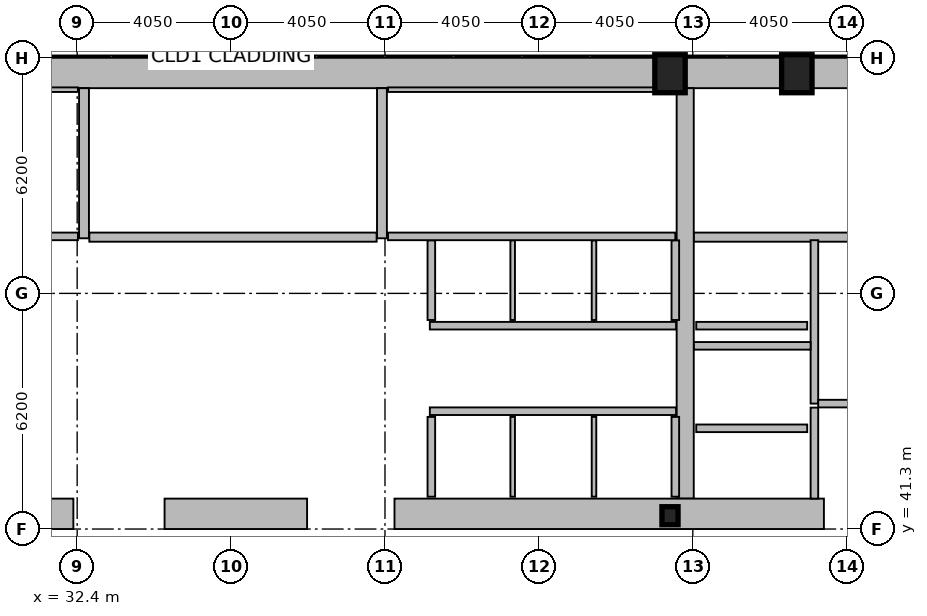
"""IFC4 building model, lengths in metres.
Left out: names, types, materials, properties, quantities, classifications, styles, units other than length and angle.
Written with IfcOpenShell. Run it as: python <this file> out.ifc"""

import sys

from ifc_helpers import new_model, si_unit, direction, frame, frame_2d, origin, origin_2d, place, context, subcontext, project, spatial, rectangle, hollow_rectangle, i_section, extrude, element, fill, save


model = new_model("IFC4")
c1 = context("Model", 3, precision=1e-05, world=origin(), true_north=direction((0.0, 1.0)))
c2 = subcontext(c1, "Body", "Model", "MODEL_VIEW")
j1 = project(units=[si_unit("LENGTHUNIT", "METRE"), si_unit("PLANEANGLEUNIT", "RADIAN")], contexts=[c1])
p1 = place(None, origin())
s1 = spatial("IfcSite", under=j1, at=p1, CompositionType="ELEMENT")
p2 = place(p1, origin())
s2 = spatial("IfcBuilding", under=s1, at=p2, CompositionType="ELEMENT")
p3 = place(p2, origin())
s3 = spatial("IfcBuildingStorey", under=s2, at=p3, CompositionType="ELEMENT", Elevation=0.0)
p4 = place(p3, frame((16.2, 53.3, 0.0), z_axis=(0.0, 0.0, 1.0), x_axis=(1.0, 0.0, 0.0)))
e1 = element("IfcWall", 1, at=p4, inside=s3, PredefinedType="SHEAR", context=c2, shape_type="SweptSolid", body=[
    extrude(rectangle(XDim=40.5, YDim=0.8, at=frame_2d((20.25, 0.0))), origin(), (0.0, 0.0, 1.0), 5.2),
])
p5 = place(p4, frame((2.8, 0.0, 0.0)))
e2 = element("IfcOpeningElement", 2, at=p5, cuts=e1, PredefinedType="OPENING", context=c2, shape_type="SweptSolid", body=[
    extrude(rectangle(XDim=1.8, YDim=2.4, at=frame_2d((0.9, 1.2))), frame((0.0, 0.41, 0.0), z_axis=(0.0, -1.0, 0.0), x_axis=(1.0, 0.0, 0.0)), (0.0, 0.0, 1.0), 0.82),
])
p6 = place(p4, frame((19.3, 0.0, 0.0)))
e3 = element("IfcOpeningElement", 3, at=p6, cuts=e1, PredefinedType="OPENING", context=c2, shape_type="SweptSolid", body=[
    extrude(rectangle(XDim=1.8, YDim=2.4, at=frame_2d((0.9, 1.2))), frame((0.0, 0.41, 0.0), z_axis=(0.0, -1.0, 0.0), x_axis=(1.0, 0.0, 0.0)), (0.0, 0.0, 1.0), 0.82),
])
p7 = place(p4, frame((35.9, 0.0, 0.0)))
e4 = element("IfcOpeningElement", 4, at=p7, cuts=e1, PredefinedType="OPENING", context=c2, shape_type="SweptSolid", body=[
    extrude(rectangle(XDim=1.8, YDim=2.4, at=frame_2d((0.9, 1.2))), frame((0.0, 0.41, 0.0), z_axis=(0.0, -1.0, 0.0), x_axis=(1.0, 0.0, 0.0)), (0.0, 0.0, 1.0), 0.82),
])
p8 = place(p3, frame((48.4, 42.1, 0.0), z_axis=(0.0, 0.0, 1.0), x_axis=(0.0, 1.0, 0.0)))
e5 = element("IfcWall", 5, at=p8, inside=s3, PredefinedType="SHEAR", context=c2, shape_type="SweptSolid", body=[
    extrude(rectangle(XDim=10.8, YDim=0.45, at=frame_2d((5.4, 0.0))), origin(), (0.0, 0.0, 1.0), 5.2),
])
p9 = place(p3, frame((32.3, 41.7, 0.0), z_axis=(0.0, 0.0, 1.0), x_axis=(-1.0, 0.0, 0.0)))
e6 = element("IfcWall", 6, at=p9, inside=s3, PredefinedType="SHEAR", context=c2, shape_type="SweptSolid", body=[
    extrude(rectangle(XDim=11.45, YDim=0.8, at=frame_2d((5.725, 0.0))), origin(), (0.0, 0.0, 1.0), 5.2),
])
p10 = place(p3, frame((38.45, 41.7, 0.0), z_axis=(0.0, 0.0, 1.0), x_axis=(-1.0, 0.0, 0.0)))
e7 = element("IfcWall", 7, at=p10, inside=s3, PredefinedType="SHEAR", context=c2, shape_type="SweptSolid", body=[
    extrude(rectangle(XDim=3.75, YDim=0.8, at=frame_2d((1.875, 0.0))), origin(), (0.0, 0.0, 1.0), 5.2),
])
p11 = place(p3, frame((52.05, 41.7, 0.0), z_axis=(0.0, 0.0, 1.0), x_axis=(-1.0, 0.0, 0.0)))
e8 = element("IfcWall", 8, at=p11, inside=s3, PredefinedType="SHEAR", context=c2, shape_type="SweptSolid", body=[
    extrude(rectangle(XDim=11.3, YDim=0.8, at=frame_2d((5.65, 0.0))), origin(), (0.0, 0.0, 1.0), 5.2),
])
for number, where, z_axis, x_axis in (
    (9, (32.58, 48.95, 0.0), (0.0, 0.0, 1.0), (0.0, 1.0, 0.0)),
    (10, (40.42, 48.95, 0.0), (0.0, 0.0, 1.0), (0.0, 1.0, 0.0)),
):
    element("IfcWall", number, at=place(p3, frame(where, z_axis=z_axis, x_axis=x_axis)), inside=s3, PredefinedType="SHEAR", context=c2, shape_type="SweptSolid", body=[
        extrude(rectangle(XDim=3.95, YDim=0.26, at=frame_2d((1.975, 0.0))), origin(), (0.0, 0.0, 1.0), 5.2),
    ])
p12 = place(p3, frame((48.63, 48.98, 0.0), z_axis=(0.0, 0.0, 1.0), x_axis=(1.0, 0.0, 0.0)))
e11 = element("IfcWall", 11, at=p12, inside=s3, PredefinedType="SHEAR", context=c2, shape_type="SweptSolid", body=[
    extrude(rectangle(XDim=7.27, YDim=0.24, at=frame_2d((3.635, 0.0))), origin(), (0.0, 0.0, 1.0), 5.2),
])
p13 = place(p12, frame((6.0, 0.0, 0.0)))
e12 = element("IfcOpeningElement", 12, at=p13, cuts=e11, PredefinedType="OPENING", context=c2, shape_type="SweptSolid", body=[
    extrude(rectangle(XDim=1.05, YDim=2.15, at=frame_2d((0.525, 1.075))), frame((0.0, 0.13, 0.0), z_axis=(0.0, -1.0, 0.0), x_axis=(1.0, 0.0, 0.0)), (0.0, 0.0, 1.0), 0.26),
])
p14 = place(p3, frame((32.72, 48.98, 0.0), z_axis=(0.0, 0.0, 1.0), x_axis=(1.0, 0.0, 0.0)))
e13 = element("IfcWall", 13, at=p14, inside=s3, PredefinedType="SHEAR", context=c2, shape_type="SweptSolid", body=[
    extrude(rectangle(XDim=7.56, YDim=0.24, at=frame_2d((3.78, 0.0))), origin(), (0.0, 0.0, 1.0), 5.2),
])
p15 = place(p14, frame((0.22, 0.0, 0.0)))
e14 = element("IfcOpeningElement", 14, at=p15, cuts=e13, PredefinedType="OPENING", context=c2, shape_type="SweptSolid", body=[
    extrude(rectangle(XDim=1.05, YDim=2.15, at=frame_2d((0.525, 1.075))), frame((0.0, 0.13, 0.0), z_axis=(0.0, -1.0, 0.0), x_axis=(1.0, 0.0, 0.0)), (0.0, 0.0, 1.0), 0.26),
])
for number, where, z_axis, x_axis in (
    (15, (48.0, 53.28, 0.0), (0.0, 0.0, 1.0), (1.0, 0.0, 0.0)),
    (16, (51.337, 53.28, 0.0), (0.0, 0.0, 1.0), (1.0, 0.0, 0.0)),
):
    element("IfcColumn", number, at=place(p3, frame(where, z_axis=z_axis, x_axis=x_axis)), inside=s3, PredefinedType="COLUMN", context=c2, shape_type="SweptSolid", body=[
        extrude(hollow_rectangle(XDim=0.8, YDim=1.0, WallThickness=0.055, at=origin_2d()), origin(), (0.0, 0.0, 1.0), 5.4),
    ])
p16 = place(p3, frame((48.0, 41.65, 0.0), z_axis=(0.0, 0.0, 1.0), x_axis=(1.0, 0.0, 0.0)))
e17 = element("IfcColumn", 17, at=p16, inside=s3, PredefinedType="COLUMN", context=c2, shape_type="SweptSolid", body=[
    extrude(i_section(OverallWidth=0.424, OverallDepth=0.474, WebThickness=0.048, FlangeThickness=0.077, at=origin_2d()), origin(), (0.0, 0.0, 1.0), 5.4),
])
p17 = place(p3, frame((41.68, 44.4, 0.0), z_axis=(0.0, 0.0, 1.0), x_axis=(1.0, 0.0, 0.0)))
e18 = element("IfcWall", 18, at=p17, inside=s3, PredefinedType="PARTITIONING", context=c2, shape_type="SweptSolid", body=[
    extrude(rectangle(XDim=6.48, YDim=0.2, at=frame_2d((3.24, 0.0))), origin(), (0.0, 0.0, 1.0), 5.2),
])
p18 = place(p17, frame((0.58, 0.0, 0.0)))
e19 = element("IfcOpeningElement", 19, at=p18, cuts=e18, PredefinedType="OPENING", context=c2, shape_type="SweptSolid", body=[
    extrude(rectangle(XDim=1.1, YDim=2.18, at=frame_2d((0.55, 1.09))), frame((0.0, 0.11, 0.0), z_axis=(0.0, -1.0, 0.0), x_axis=(1.0, 0.0, 0.0)), (0.0, 0.0, 1.0), 0.22),
])
p19 = place(p17, frame((2.74, 0.0, 0.0)))
e20 = element("IfcOpeningElement", 20, at=p19, cuts=e18, PredefinedType="OPENING", context=c2, shape_type="SweptSolid", body=[
    extrude(rectangle(XDim=1.1, YDim=2.18, at=frame_2d((0.55, 1.09))), frame((0.0, 0.11, 0.0), z_axis=(0.0, -1.0, 0.0), x_axis=(1.0, 0.0, 0.0)), (0.0, 0.0, 1.0), 0.22),
])
p20 = place(p17, frame((4.9, 0.0, 0.0)))
e21 = element("IfcOpeningElement", 21, at=p20, cuts=e18, PredefinedType="OPENING", context=c2, shape_type="SweptSolid", body=[
    extrude(rectangle(XDim=1.1, YDim=2.18, at=frame_2d((0.55, 1.09))), frame((0.0, 0.11, 0.0), z_axis=(0.0, -1.0, 0.0), x_axis=(1.0, 0.0, 0.0)), (0.0, 0.0, 1.0), 0.22),
])
p21 = place(p3, frame((51.61, 43.95, 0.0), z_axis=(0.0, 0.0, 1.0), x_axis=(-1.0, 0.0, 0.0)))
e22 = element("IfcWall", 22, at=p21, inside=s3, PredefinedType="PARTITIONING", context=c2, shape_type="SweptSolid", body=[
    extrude(rectangle(XDim=2.92, YDim=0.2, at=frame_2d((1.46, 0.0))), origin(), (0.0, 0.0, 1.0), 5.2),
])
p22 = place(p21, frame((0.81, 0.0, 0.0)))
e23 = element("IfcOpeningElement", 23, at=p22, cuts=e22, PredefinedType="OPENING", context=c2, shape_type="SweptSolid", body=[
    extrude(rectangle(XDim=1.3, YDim=2.18, at=frame_2d((0.65, 1.09))), frame((0.0, 0.11, 0.0), z_axis=(0.0, -1.0, 0.0), x_axis=(1.0, 0.0, 0.0)), (0.0, 0.0, 1.0), 0.22),
])
p23 = place(p3, frame((51.61, 46.65, 0.0), z_axis=(0.0, 0.0, 1.0), x_axis=(-1.0, 0.0, 0.0)))
e24 = element("IfcWall", 24, at=p23, inside=s3, PredefinedType="PARTITIONING", context=c2, shape_type="SweptSolid", body=[
    extrude(rectangle(XDim=2.92, YDim=0.2, at=frame_2d((1.46, 0.0))), origin(), (0.0, 0.0, 1.0), 5.2),
])
p24 = place(p23, frame((0.86, 0.0, 0.0)))
e25 = element("IfcOpeningElement", 25, at=p24, cuts=e24, PredefinedType="OPENING", context=c2, shape_type="SweptSolid", body=[
    extrude(rectangle(XDim=1.2, YDim=2.18, at=frame_2d((0.6, 1.09))), frame((0.0, 0.11, 0.0), z_axis=(0.0, -1.0, 0.0), x_axis=(1.0, 0.0, 0.0)), (0.0, 0.0, 1.0), 0.22),
])
p25 = place(p3, frame((48.16, 46.65, 0.0), z_axis=(0.0, 0.0, 1.0), x_axis=(-1.0, 0.0, 0.0)))
e26 = element("IfcWall", 26, at=p25, inside=s3, PredefinedType="PARTITIONING", context=c2, shape_type="SweptSolid", body=[
    extrude(rectangle(XDim=6.48, YDim=0.2, at=frame_2d((3.24, 0.0))), origin(), (0.0, 0.0, 1.0), 5.2),
])
p26 = place(p25, frame((4.8, 0.0, 0.0)))
e27 = element("IfcOpeningElement", 27, at=p26, cuts=e26, PredefinedType="OPENING", context=c2, shape_type="SweptSolid", body=[
    extrude(rectangle(XDim=1.1, YDim=2.18, at=frame_2d((0.55, 1.09))), frame((0.0, 0.11, 0.0), z_axis=(0.0, -1.0, 0.0), x_axis=(1.0, 0.0, 0.0)), (0.0, 0.0, 1.0), 0.22),
])
p27 = place(p25, frame((2.64, 0.0, 0.0)))
e28 = element("IfcOpeningElement", 28, at=p27, cuts=e26, PredefinedType="OPENING", context=c2, shape_type="SweptSolid", body=[
    extrude(rectangle(XDim=1.1, YDim=2.18, at=frame_2d((0.55, 1.09))), frame((0.0, 0.11, 0.0), z_axis=(0.0, -1.0, 0.0), x_axis=(1.0, 0.0, 0.0)), (0.0, 0.0, 1.0), 0.22),
])
p28 = place(p25, frame((0.48, 0.0, 0.0)))
e29 = element("IfcOpeningElement", 29, at=p28, cuts=e26, PredefinedType="OPENING", context=c2, shape_type="SweptSolid", body=[
    extrude(rectangle(XDim=1.1, YDim=2.18, at=frame_2d((0.55, 1.09))), frame((0.0, 0.11, 0.0), z_axis=(0.0, -1.0, 0.0), x_axis=(1.0, 0.0, 0.0)), (0.0, 0.0, 1.0), 0.22),
])
p29 = place(p3, frame((51.8, 44.6, 0.0), z_axis=(0.0, 0.0, 1.0), x_axis=(0.0, 1.0, 0.0)))
e30 = element("IfcWall", 30, at=p29, inside=s3, PredefinedType="PARTITIONING", context=c2, shape_type="SweptSolid", body=[
    extrude(rectangle(XDim=4.3, YDim=0.2, at=frame_2d((2.15, 0.0))), origin(), (0.0, 0.0, 1.0), 5.2),
])
p30 = place(p3, frame((51.9, 44.6, 0.0), z_axis=(0.0, 0.0, 1.0), x_axis=(1.0, 0.0, 0.0)))
e31 = element("IfcWall", 31, at=p30, inside=s3, PredefinedType="PARTITIONING", context=c2, shape_type="SweptSolid", body=[
    extrude(rectangle(XDim=4.0, YDim=0.2, at=frame_2d((2.0, 0.0))), origin(), (0.0, 0.0, 1.0), 5.2),
])
p31 = place(p30, frame((1.15, 0.0, 0.0)))
e32 = element("IfcOpeningElement", 32, at=p31, cuts=e31, PredefinedType="OPENING", context=c2, shape_type="SweptSolid", body=[
    extrude(rectangle(XDim=1.05, YDim=2.15, at=frame_2d((0.525, 1.075))), frame((0.0, 0.11, 0.0), z_axis=(0.0, -1.0, 0.0), x_axis=(1.0, 0.0, 0.0)), (0.0, 0.0, 1.0), 0.22),
])
p32 = place(p3, frame((48.63, 46.12, 0.0), z_axis=(0.0, 0.0, 1.0), x_axis=(1.0, 0.0, 0.0)))
e33 = element("IfcWall", 33, at=p32, inside=s3, PredefinedType="PARTITIONING", context=c2, shape_type="SweptSolid", body=[
    extrude(rectangle(XDim=3.07, YDim=0.2, at=frame_2d((1.535, 0.0))), origin(), (0.0, 0.0, 1.0), 5.2),
])
p33 = place(p3, frame((51.8, 42.1, 0.0), z_axis=(0.0, 0.0, 1.0), x_axis=(0.0, 1.0, 0.0)))
e34 = element("IfcWall", 34, at=p33, inside=s3, PredefinedType="PARTITIONING", context=c2, shape_type="SweptSolid", body=[
    extrude(rectangle(XDim=2.395, YDim=0.2, at=frame_2d((1.198, 0.0))), origin(), (0.0, 0.0, 1.0), 5.2),
])
p34 = place(p33, frame((0.38, 0.0, 0.0)))
e35 = element("IfcOpeningElement", 35, at=p34, cuts=e34, PredefinedType="OPENING", context=c2, shape_type="SweptSolid", body=[
    extrude(rectangle(XDim=1.05, YDim=2.15, at=frame_2d((0.525, 1.075))), frame((0.0, 0.11, 0.0), z_axis=(0.0, -1.0, 0.0), x_axis=(1.0, 0.0, 0.0)), (0.0, 0.0, 1.0), 0.22),
])
for number, where, z_axis, x_axis in (
    (36, (41.72, 46.8, 0.0), (0.0, 0.0, 1.0), (0.0, 1.0, 0.0)),
    (37, (48.14, 46.8, 0.0), (0.0, 0.0, 1.0), (0.0, 1.0, 0.0)),
):
    element("IfcWall", number, at=place(p3, frame(where, z_axis=z_axis, x_axis=x_axis)), inside=s3, PredefinedType="PARTITIONING", context=c2, shape_type="SweptSolid", body=[
        extrude(rectangle(XDim=2.095, YDim=0.2, at=frame_2d((1.047, 0.0))), origin(), (0.0, 0.0, 1.0), 5.2),
    ])
for number, where, z_axis, x_axis in (
    (38, (43.86, 46.8, 0.0), (0.0, 0.0, 1.0), (0.0, 1.0, 0.0)),
    (39, (46.0, 46.8, 0.0), (0.0, 0.0, 1.0), (0.0, 1.0, 0.0)),
):
    element("IfcWall", number, at=place(p3, frame(where, z_axis=z_axis, x_axis=x_axis)), inside=s3, PredefinedType="PARTITIONING", context=c2, shape_type="SweptSolid", body=[
        extrude(rectangle(XDim=2.095, YDim=0.12, at=frame_2d((1.047, 0.0))), origin(), (0.0, 0.0, 1.0), 5.2),
    ])
for number, where, z_axis, x_axis in (
    (40, (41.72, 42.15, 0.0), (0.0, 0.0, 1.0), (0.0, 1.0, 0.0)),
    (41, (48.14, 42.15, 0.0), (0.0, 0.0, 1.0), (0.0, 1.0, 0.0)),
):
    element("IfcWall", number, at=place(p3, frame(where, z_axis=z_axis, x_axis=x_axis)), inside=s3, PredefinedType="PARTITIONING", context=c2, shape_type="SweptSolid", body=[
        extrude(rectangle(XDim=2.1, YDim=0.2, at=frame_2d((1.05, 0.0))), origin(), (0.0, 0.0, 1.0), 5.2),
    ])
for number, where, z_axis, x_axis in (
    (42, (43.86, 42.15, 0.0), (0.0, 0.0, 1.0), (0.0, 1.0, 0.0)),
    (43, (46.0, 42.15, 0.0), (0.0, 0.0, 1.0), (0.0, 1.0, 0.0)),
):
    element("IfcWall", number, at=place(p3, frame(where, z_axis=z_axis, x_axis=x_axis)), inside=s3, PredefinedType="PARTITIONING", context=c2, shape_type="SweptSolid", body=[
        extrude(rectangle(XDim=2.1, YDim=0.12, at=frame_2d((1.05, 0.0))), origin(), (0.0, 0.0, 1.0), 5.2),
    ])
p35 = place(p3, frame((24.7, 52.86, 0.0), z_axis=(0.0, 0.0, 1.0), x_axis=(1.0, 0.0, 0.0)))
e44 = element("IfcWall", 44, at=p35, inside=s3, PredefinedType="PARTITIONING", context=c2, shape_type="SweptSolid", body=[
    extrude(rectangle(XDim=7.72, YDim=0.12, at=frame_2d((3.86, 0.0))), origin(), (0.0, 0.0, 1.0), 5.2),
])
p36 = place(p3, frame((24.7, 49.0, 0.0), z_axis=(0.0, 0.0, 1.0), x_axis=(1.0, 0.0, 0.0)))
e45 = element("IfcWall", 45, at=p36, inside=s3, PredefinedType="PARTITIONING", context=c2, shape_type="SweptSolid", body=[
    extrude(rectangle(XDim=7.72, YDim=0.2, at=frame_2d((3.86, 0.0))), origin(), (0.0, 0.0, 1.0), 5.2),
])
p37 = place(p36, frame((6.56, 0.0, 0.0)))
e46 = element("IfcOpeningElement", 46, at=p37, cuts=e45, PredefinedType="OPENING", context=c2, shape_type="SweptSolid", body=[
    extrude(rectangle(XDim=0.95, YDim=2.1, at=frame_2d((0.475, 1.05))), frame((0.0, 0.11, 0.0), z_axis=(0.0, -1.0, 0.0), x_axis=(1.0, 0.0, 0.0)), (0.0, 0.0, 1.0), 0.22),
])
p38 = place(p3, frame((40.58, 52.86, 0.0), z_axis=(0.0, 0.0, 1.0), x_axis=(1.0, 0.0, 0.0)))
e47 = element("IfcWall", 47, at=p38, inside=s3, PredefinedType="PARTITIONING", context=c2, shape_type="SweptSolid", body=[
    extrude(rectangle(XDim=7.56, YDim=0.12, at=frame_2d((3.78, 0.0))), origin(), (0.0, 0.0, 1.0), 5.2),
])
p39 = place(p3, frame((40.58, 49.0, 0.0), z_axis=(0.0, 0.0, 1.0), x_axis=(1.0, 0.0, 0.0)))
e48 = element("IfcWall", 48, at=p39, inside=s3, PredefinedType="PARTITIONING", context=c2, shape_type="SweptSolid", body=[
    extrude(rectangle(XDim=7.56, YDim=0.2, at=frame_2d((3.78, 0.0))), origin(), (0.0, 0.0, 1.0), 5.2),
])
p40 = place(p39, frame((0.16, 0.0, 0.0)))
e49 = element("IfcOpeningElement", 49, at=p40, cuts=e48, PredefinedType="OPENING", context=c2, shape_type="SweptSolid", body=[
    extrude(rectangle(XDim=0.95, YDim=2.1, at=frame_2d((0.475, 1.05))), frame((0.0, 0.11, 0.0), z_axis=(0.0, -1.0, 0.0), x_axis=(1.0, 0.0, 0.0)), (0.0, 0.0, 1.0), 0.22),
])
p41 = place(p6, origin())
e50 = element("IfcDoor", 50, at=p41, inside=s3, OperationType="DOUBLE_DOOR_SINGLE_SWING", PredefinedType="DOOR", context=c2, shape_type="SweptSolid", body=[
    extrude(rectangle(XDim=1.8, YDim=2.4, at=frame_2d((0.9, 1.2))), frame((0.0, 0.025, 0.0), z_axis=(0.0, -1.0, 0.0), x_axis=(1.0, 0.0, 0.0)), (0.0, 0.0, 1.0), 0.05),
])
fill(e3, e50)
p42 = place(p7, origin())
e51 = element("IfcDoor", 51, at=p42, inside=s3, OperationType="DOUBLE_DOOR_SINGLE_SWING", PredefinedType="DOOR", context=c2, shape_type="SweptSolid", body=[
    extrude(rectangle(XDim=1.8, YDim=2.4, at=frame_2d((0.9, 1.2))), frame((0.0, 0.025, 0.0), z_axis=(0.0, -1.0, 0.0), x_axis=(1.0, 0.0, 0.0)), (0.0, 0.0, 1.0), 0.05),
])
fill(e4, e51)
p43 = place(p15, origin())
e52 = element("IfcDoor", 52, at=p43, inside=s3, OperationType="SINGLE_SWING_LEFT", PredefinedType="DOOR", context=c2, shape_type="SweptSolid", body=[
    extrude(rectangle(XDim=1.05, YDim=2.15, at=frame_2d((0.525, 1.075))), frame((0.0, 0.025, 0.0), z_axis=(0.0, -1.0, 0.0), x_axis=(1.0, 0.0, 0.0)), (0.0, 0.0, 1.0), 0.05),
])
fill(e14, e52)
p44 = place(p18, origin())
e53 = element("IfcDoor", 53, at=p44, inside=s3, OperationType="SLIDING_TO_LEFT", PredefinedType="DOOR", context=c2, shape_type="SweptSolid", body=[
    extrude(rectangle(XDim=1.1, YDim=2.18, at=frame_2d((0.55, 1.09))), frame((0.0, 0.025, 0.0), z_axis=(0.0, -1.0, 0.0), x_axis=(1.0, 0.0, 0.0)), (0.0, 0.0, 1.0), 0.05),
])
fill(e19, e53)
p45 = place(p19, origin())
e54 = element("IfcDoor", 54, at=p45, inside=s3, OperationType="SLIDING_TO_LEFT", PredefinedType="DOOR", context=c2, shape_type="SweptSolid", body=[
    extrude(rectangle(XDim=1.1, YDim=2.18, at=frame_2d((0.55, 1.09))), frame((0.0, 0.025, 0.0), z_axis=(0.0, -1.0, 0.0), x_axis=(1.0, 0.0, 0.0)), (0.0, 0.0, 1.0), 0.05),
])
fill(e20, e54)
p46 = place(p20, origin())
e55 = element("IfcDoor", 55, at=p46, inside=s3, OperationType="SLIDING_TO_LEFT", PredefinedType="DOOR", context=c2, shape_type="SweptSolid", body=[
    extrude(rectangle(XDim=1.1, YDim=2.18, at=frame_2d((0.55, 1.09))), frame((0.0, 0.025, 0.0), z_axis=(0.0, -1.0, 0.0), x_axis=(1.0, 0.0, 0.0)), (0.0, 0.0, 1.0), 0.05),
])
fill(e21, e55)
p47 = place(p22, origin())
e56 = element("IfcDoor", 56, at=p47, inside=s3, OperationType="SLIDING_TO_LEFT", PredefinedType="DOOR", context=c2, shape_type="SweptSolid", body=[
    extrude(rectangle(XDim=1.3, YDim=2.18, at=frame_2d((0.65, 1.09))), frame((0.0, 0.025, 0.0), z_axis=(0.0, -1.0, 0.0), x_axis=(1.0, 0.0, 0.0)), (0.0, 0.0, 1.0), 0.05),
])
fill(e23, e56)
p48 = place(p24, origin())
e57 = element("IfcDoor", 57, at=p48, inside=s3, OperationType="SLIDING_TO_LEFT", PredefinedType="DOOR", context=c2, shape_type="SweptSolid", body=[
    extrude(rectangle(XDim=1.2, YDim=2.18, at=frame_2d((0.6, 1.09))), frame((0.0, 0.025, 0.0), z_axis=(0.0, -1.0, 0.0), x_axis=(1.0, 0.0, 0.0)), (0.0, 0.0, 1.0), 0.05),
])
fill(e25, e57)
p49 = place(p26, origin())
e58 = element("IfcDoor", 58, at=p49, inside=s3, OperationType="SLIDING_TO_LEFT", PredefinedType="DOOR", context=c2, shape_type="SweptSolid", body=[
    extrude(rectangle(XDim=1.1, YDim=2.18, at=frame_2d((0.55, 1.09))), frame((0.0, 0.025, 0.0), z_axis=(0.0, -1.0, 0.0), x_axis=(1.0, 0.0, 0.0)), (0.0, 0.0, 1.0), 0.05),
])
fill(e27, e58)
p50 = place(p27, origin())
e59 = element("IfcDoor", 59, at=p50, inside=s3, OperationType="SLIDING_TO_LEFT", PredefinedType="DOOR", context=c2, shape_type="SweptSolid", body=[
    extrude(rectangle(XDim=1.1, YDim=2.18, at=frame_2d((0.55, 1.09))), frame((0.0, 0.025, 0.0), z_axis=(0.0, -1.0, 0.0), x_axis=(1.0, 0.0, 0.0)), (0.0, 0.0, 1.0), 0.05),
])
fill(e28, e59)
p51 = place(p28, origin())
e60 = element("IfcDoor", 60, at=p51, inside=s3, OperationType="SLIDING_TO_LEFT", PredefinedType="DOOR", context=c2, shape_type="SweptSolid", body=[
    extrude(rectangle(XDim=1.1, YDim=2.18, at=frame_2d((0.55, 1.09))), frame((0.0, 0.025, 0.0), z_axis=(0.0, -1.0, 0.0), x_axis=(1.0, 0.0, 0.0)), (0.0, 0.0, 1.0), 0.05),
])
fill(e29, e60)
p52 = place(p34, origin())
e61 = element("IfcDoor", 61, at=p52, inside=s3, OperationType="SINGLE_SWING_LEFT", PredefinedType="DOOR", context=c2, shape_type="SweptSolid", body=[
    extrude(rectangle(XDim=1.05, YDim=2.15, at=frame_2d((0.525, 1.075))), frame((0.0, 0.025, 0.0), z_axis=(0.0, -1.0, 0.0), x_axis=(1.0, 0.0, 0.0)), (0.0, 0.0, 1.0), 0.05),
])
fill(e35, e61)
p53 = place(p37, origin())
e62 = element("IfcDoor", 62, at=p53, inside=s3, OperationType="SINGLE_SWING_RIGHT", PredefinedType="DOOR", context=c2, shape_type="SweptSolid", body=[
    extrude(rectangle(XDim=0.95, YDim=2.1, at=frame_2d((0.475, 1.05))), frame((0.0, 0.025, 0.0), z_axis=(0.0, -1.0, 0.0), x_axis=(1.0, 0.0, 0.0)), (0.0, 0.0, 1.0), 0.05),
])
fill(e46, e62)
p54 = place(p40, origin())
e63 = element("IfcDoor", 63, at=p54, inside=s3, OperationType="SINGLE_SWING_RIGHT", PredefinedType="DOOR", context=c2, shape_type="SweptSolid", body=[
    extrude(rectangle(XDim=0.95, YDim=2.1, at=frame_2d((0.475, 1.05))), frame((0.0, 0.025, 0.0), z_axis=(0.0, -1.0, 0.0), x_axis=(1.0, 0.0, 0.0)), (0.0, 0.0, 1.0), 0.05),
])
fill(e49, e63)
save(model, sys.argv[1])
